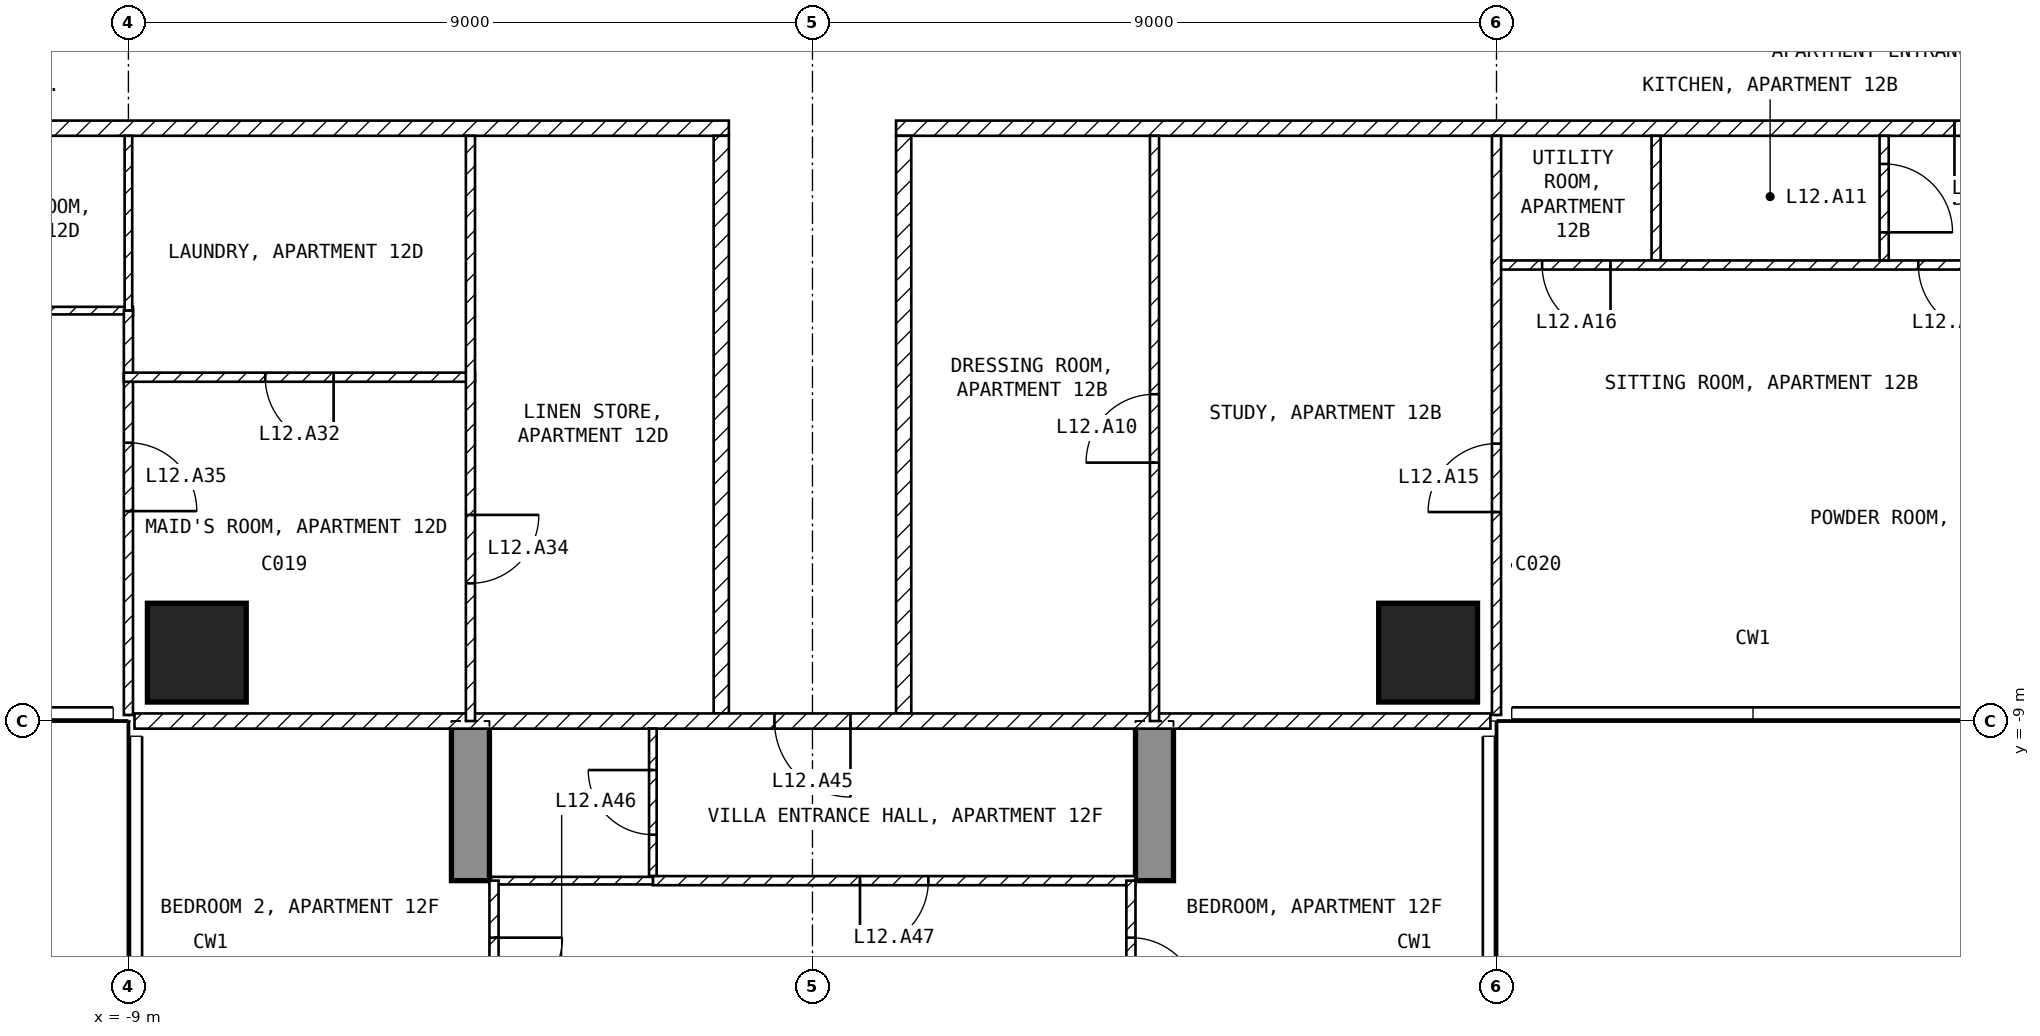
"""IFC4 building model, lengths in metres.
Left out: names, types, materials, properties, quantities, classifications, styles, units other than length and angle.
Written with IfcOpenShell. Run it as: python <this file> out.ifc"""

import sys

from ifc_helpers import new_model, si_unit, direction, frame, frame_2d, origin, origin_2d, place, context, subcontext, project, spatial, polyline, rectangle, outline, extrude, element, fill, save


model = new_model("IFC4")
c1 = context("Model", 3, precision=1e-05, world=origin(), true_north=direction((0.0, 1.0)))
c2 = subcontext(c1, "Body", "Model", "MODEL_VIEW")
j1 = project(units=[si_unit("LENGTHUNIT", "METRE"), si_unit("PLANEANGLEUNIT", "RADIAN")], contexts=[c1])
p1 = place(None, origin())
s1 = spatial("IfcSite", under=j1, at=p1, CompositionType="ELEMENT")
p2 = place(p1, origin())
s2 = spatial("IfcBuilding", under=s1, at=p2, CompositionType="ELEMENT")
p3 = place(p2, frame((0.0, 0.0, 61.0)))
s3 = spatial("IfcBuildingStorey", under=s2, at=p3, CompositionType="ELEMENT", Elevation=61.0)
for number, where, z_axis, x_axis in (
    (1, (-8.1, -8.1, -0.25), (0.0, 0.0, 1.0), (1.0, 0.0, 0.0)),
    (2, (8.1, -8.1, -0.25), (0.0, 0.0, 1.0), (1.0, 0.0, 0.0)),
):
    element("IfcColumn", number, at=place(p3, frame(where, z_axis=z_axis, x_axis=x_axis)), inside=s3, PredefinedType="COLUMN", context=c2, shape_type="SweptSolid", body=[
        extrude(rectangle(XDim=1.3, YDim=1.3, at=origin_2d()), origin(), (0.0, 0.0, 1.0), 3.5),
    ])
for number, where, z_axis, x_axis in (
    (3, (-4.75, -25.45, -0.25), (1.0, 0.0, 0.0), (0.0, 1.0, 0.0)),
    (4, (4.25, -25.45, -0.25), (1.0, 0.0, 0.0), (0.0, 1.0, 0.0)),
):
    element("IfcWall", number, at=place(p3, frame(where, z_axis=z_axis, x_axis=x_axis)), inside=s3, PredefinedType="SHEAR", context=c2, shape_type="SweptSolid", body=[
        extrude(outline(polyline([(0.0, 0.0), (4.15, 0.0), (4.15, 2.65), (6.55, 2.65), (6.55, 0.0), (11.95, 0.0), (11.95, 2.65), (14.35, 2.65), (14.35, 0.0), (16.45, 0.0), (16.45, 3.5), (0.0, 3.5), (0.0, 0.0)])), origin(), (0.0, 0.0, 1.0), 0.5),
    ])
p4 = place(p3, frame((21.6, -1.2, 0.0), z_axis=(0.0, 0.0, 1.0), x_axis=(-1.0, 0.0, 0.0)))
e5 = element("IfcWall", 5, at=p4, inside=s3, PredefinedType="PARTITIONING", context=c2, shape_type="SweptSolid", body=[
    extrude(rectangle(XDim=20.5, YDim=0.2, at=frame_2d((10.25, 0.0))), origin(), (0.0, 0.0, 1.0), 3.25),
])
p5 = place(p4, frame((5.575, 0.0, 0.0)))
e6 = element("IfcOpeningElement", 6, at=p5, cuts=e5, PredefinedType="OPENING", context=c2, shape_type="SweptSolid", body=[
    extrude(rectangle(XDim=1.0, YDim=2.1, at=frame_2d((0.5, 1.05))), frame((0.0, 0.11, 0.0), z_axis=(0.0, -1.0, 0.0), x_axis=(1.0, 0.0, 0.0)), (0.0, 0.0, 1.0), 0.22),
])
p6 = place(p3, frame((1.2, -1.3, 0.0), z_axis=(0.0, 0.0, 1.0), x_axis=(0.0, -1.0, 0.0)))
e7 = element("IfcWall", 7, at=p6, inside=s3, PredefinedType="PARTITIONING", context=c2, shape_type="SweptSolid", body=[
    extrude(rectangle(XDim=7.6, YDim=0.2, at=frame_2d((3.8, 0.0))), origin(), (0.0, 0.0, 1.0), 3.25),
])
p7 = place(p3, frame((-1.1, -1.2, 0.0), z_axis=(0.0, 0.0, 1.0), x_axis=(-1.0, 0.0, 0.0)))
e8 = element("IfcWall", 8, at=p7, inside=s3, PredefinedType="PARTITIONING", context=c2, shape_type="SweptSolid", body=[
    extrude(rectangle(XDim=20.5, YDim=0.2, at=frame_2d((10.25, 0.0))), origin(), (0.0, 0.0, 1.0), 3.25),
])
p8 = place(p7, frame((16.025, 0.0, 0.0)))
e9 = element("IfcOpeningElement", 9, at=p8, cuts=e8, PredefinedType="OPENING", context=c2, shape_type="SweptSolid", body=[
    extrude(rectangle(XDim=1.0, YDim=2.1, at=frame_2d((0.5, 1.05))), frame((0.0, 0.11, 0.0), z_axis=(0.0, -1.0, 0.0), x_axis=(1.0, 0.0, 0.0)), (0.0, 0.0, 1.0), 0.22),
])
p9 = place(p3, frame((-1.2, -8.9, 0.0), z_axis=(0.0, 0.0, 1.0), x_axis=(0.0, 1.0, 0.0)))
e10 = element("IfcWall", 10, at=p9, inside=s3, PredefinedType="PARTITIONING", context=c2, shape_type="SweptSolid", body=[
    extrude(rectangle(XDim=7.6, YDim=0.2, at=frame_2d((3.8, 0.0))), origin(), (0.0, 0.0, 1.0), 3.25),
])
p10 = place(p3, frame((8.92, -9.0, 0.0), z_axis=(0.0, 0.0, 1.0), x_axis=(-1.0, 0.0, 0.0)))
e11 = element("IfcWall", 11, at=p10, inside=s3, PredefinedType="PARTITIONING", context=c2, shape_type="SweptSolid", body=[
    extrude(rectangle(XDim=17.84, YDim=0.2, at=frame_2d((8.92, 0.0))), origin(), (0.0, 0.0, 1.0), 3.25),
])
p11 = place(p10, frame((8.42, 0.0, 0.0)))
e12 = element("IfcOpeningElement", 12, at=p11, cuts=e11, PredefinedType="OPENING", context=c2, shape_type="SweptSolid", body=[
    extrude(rectangle(XDim=1.0, YDim=2.1, at=frame_2d((0.5, 1.05))), frame((0.0, 0.11, 0.0), z_axis=(0.0, -1.0, 0.0), x_axis=(1.0, 0.0, 0.0)), (0.0, 0.0, 1.0), 0.22),
])
p12 = place(p3, frame((11.1, -1.3, 0.0), z_axis=(0.0, 0.0, 1.0), x_axis=(0.0, -1.0, 0.0)))
e13 = element("IfcWall", 13, at=p12, inside=s3, PredefinedType="PARTITIONING", context=c2, shape_type="SweptSolid", body=[
    extrude(rectangle(XDim=1.64, YDim=0.12, at=frame_2d((0.82, 0.0))), origin(), (0.0, 0.0, 1.0), 3.25),
])
p13 = place(p3, frame((15.9, -3.0, 0.0), z_axis=(0.0, 0.0, 1.0), x_axis=(-1.0, 0.0, 0.0)))
e14 = element("IfcWall", 14, at=p13, inside=s3, PredefinedType="PARTITIONING", context=c2, shape_type="SweptSolid", body=[
    extrude(rectangle(XDim=6.96, YDim=0.12, at=frame_2d((3.48, 0.0))), origin(), (0.0, 0.0, 1.0), 3.25),
])
p14 = place(p13, frame((0.45, 0.0, 0.0)))
e15 = element("IfcOpeningElement", 15, at=p14, cuts=e14, PredefinedType="OPENING", context=c2, shape_type="SweptSolid", body=[
    extrude(rectangle(XDim=0.9, YDim=2.1, at=frame_2d((0.45, 1.05))), frame((0.0, 0.07, 0.0), z_axis=(0.0, -1.0, 0.0), x_axis=(1.0, 0.0, 0.0)), (0.0, 0.0, 1.0), 0.14),
])
p15 = place(p13, frame((5.4, 0.0, 0.0)))
e16 = element("IfcOpeningElement", 16, at=p15, cuts=e14, PredefinedType="OPENING", context=c2, shape_type="SweptSolid", body=[
    extrude(rectangle(XDim=0.9, YDim=2.1, at=frame_2d((0.45, 1.05))), frame((0.0, 0.07, 0.0), z_axis=(0.0, -1.0, 0.0), x_axis=(1.0, 0.0, 0.0)), (0.0, 0.0, 1.0), 0.14),
])
p16 = place(p3, frame((9.0, -8.92, 0.0), z_axis=(0.0, 0.0, 1.0), x_axis=(0.0, 1.0, 0.0)))
e17 = element("IfcWall", 17, at=p16, inside=s3, PredefinedType="PARTITIONING", context=c2, shape_type="SweptSolid", body=[
    extrude(rectangle(XDim=7.62, YDim=0.12, at=frame_2d((3.81, 0.0))), origin(), (0.0, 0.0, 1.0), 3.25),
])
p17 = place(p16, frame((2.67, 0.0, 0.0)))
e18 = element("IfcOpeningElement", 18, at=p17, cuts=e17, PredefinedType="OPENING", context=c2, shape_type="SweptSolid", body=[
    extrude(rectangle(XDim=0.9, YDim=2.1, at=frame_2d((0.45, 1.05))), frame((0.0, 0.07, 0.0), z_axis=(0.0, -1.0, 0.0), x_axis=(1.0, 0.0, 0.0)), (0.0, 0.0, 1.0), 0.14),
])
p18 = place(p3, frame((14.1, -1.3, 0.0), z_axis=(0.0, 0.0, 1.0), x_axis=(0.0, -1.0, 0.0)))
e19 = element("IfcWall", 19, at=p18, inside=s3, PredefinedType="PARTITIONING", context=c2, shape_type="SweptSolid", body=[
    extrude(rectangle(XDim=1.64, YDim=0.12, at=frame_2d((0.82, 0.0))), origin(), (0.0, 0.0, 1.0), 3.25),
])
p19 = place(p18, frame((0.37, 0.0, 0.0)))
e20 = element("IfcOpeningElement", 20, at=p19, cuts=e19, PredefinedType="OPENING", context=c2, shape_type="SweptSolid", body=[
    extrude(rectangle(XDim=0.9, YDim=2.1, at=frame_2d((0.45, 1.05))), frame((0.0, 0.07, 0.0), z_axis=(0.0, -1.0, 0.0), x_axis=(1.0, 0.0, 0.0)), (0.0, 0.0, 1.0), 0.14),
])
p20 = place(p3, frame((4.5, -9.0, 0.0), z_axis=(0.0, 0.0, 1.0), x_axis=(0.0, 1.0, 0.0)))
e21 = element("IfcWall", 21, at=p20, inside=s3, PredefinedType="PARTITIONING", context=c2, shape_type="SweptSolid", body=[
    extrude(rectangle(XDim=7.7, YDim=0.12, at=frame_2d((3.85, 0.0))), origin(), (0.0, 0.0, 1.0), 3.25),
])
p21 = place(p20, frame((3.4, 0.0, 0.0)))
e22 = element("IfcOpeningElement", 22, at=p21, cuts=e21, PredefinedType="OPENING", context=c2, shape_type="SweptSolid", body=[
    extrude(rectangle(XDim=0.9, YDim=2.1, at=frame_2d((0.45, 1.05))), frame((0.0, 0.07, 0.0), z_axis=(0.0, -1.0, 0.0), x_axis=(1.0, 0.0, 0.0)), (0.0, 0.0, 1.0), 0.14),
])
p22 = place(p3, frame((-8.94, -3.6, 0.0), z_axis=(0.0, 0.0, 1.0), x_axis=(-1.0, 0.0, 0.0)))
e23 = element("IfcWall", 23, at=p22, inside=s3, PredefinedType="PARTITIONING", context=c2, shape_type="SweptSolid", body=[
    extrude(rectangle(XDim=3.36, YDim=0.1, at=frame_2d((1.68, 0.0))), origin(), (0.0, 0.0, 1.0), 3.25),
])
p23 = place(p22, frame((1.285, 0.0, 0.0)))
e24 = element("IfcOpeningElement", 24, at=p23, cuts=e23, PredefinedType="OPENING", context=c2, shape_type="SweptSolid", body=[
    extrude(rectangle(XDim=0.85, YDim=2.1, at=frame_2d((0.425, 1.05))), frame((0.0, 0.06, 0.0), z_axis=(0.0, -1.0, 0.0), x_axis=(1.0, 0.0, 0.0)), (0.0, 0.0, 1.0), 0.12),
])
p24 = place(p3, frame((-9.0, -1.3, 0.0), z_axis=(0.0, 0.0, 1.0), x_axis=(0.0, -1.0, 0.0)))
e25 = element("IfcWall", 25, at=p24, inside=s3, PredefinedType="PARTITIONING", context=c2, shape_type="SweptSolid", body=[
    extrude(rectangle(XDim=2.3, YDim=0.1, at=frame_2d((1.15, 0.0))), origin(), (0.0, 0.0, 1.0), 3.25),
])
p25 = place(p3, frame((-9.0, -3.6, 0.0), z_axis=(0.0, 0.0, 1.0), x_axis=(0.0, -1.0, 0.0)))
e26 = element("IfcWall", 26, at=p25, inside=s3, PredefinedType="PARTITIONING", context=c2, shape_type="SweptSolid", body=[
    extrude(rectangle(XDim=5.32, YDim=0.12, at=frame_2d((2.66, 0.0))), origin(), (0.0, 0.0, 1.0), 3.25),
])
p26 = place(p25, frame((1.738, 0.0, 0.0)))
e27 = element("IfcOpeningElement", 27, at=p26, cuts=e26, PredefinedType="OPENING", context=c2, shape_type="SweptSolid", body=[
    extrude(rectangle(XDim=0.9, YDim=2.1, at=frame_2d((0.45, 1.05))), frame((0.0, 0.07, 0.0), z_axis=(0.0, -1.0, 0.0), x_axis=(1.0, 0.0, 0.0)), (0.0, 0.0, 1.0), 0.14),
])
p27 = place(p3, frame((-4.44, -4.476, 0.0), z_axis=(0.0, 0.0, 1.0), x_axis=(-1.0, 0.0, 0.0)))
e28 = element("IfcWall", 28, at=p27, inside=s3, PredefinedType="PARTITIONING", context=c2, shape_type="SweptSolid", body=[
    extrude(rectangle(XDim=4.62, YDim=0.12, at=frame_2d((2.31, 0.0))), origin(), (0.0, 0.0, 1.0), 3.25),
])
p28 = place(p27, frame((1.86, 0.0, 0.0)))
e29 = element("IfcOpeningElement", 29, at=p28, cuts=e28, PredefinedType="OPENING", context=c2, shape_type="SweptSolid", body=[
    extrude(rectangle(XDim=0.9, YDim=2.1, at=frame_2d((0.45, 1.05))), frame((0.0, 0.07, 0.0), z_axis=(0.0, -1.0, 0.0), x_axis=(1.0, 0.0, 0.0)), (0.0, 0.0, 1.0), 0.14),
])
p29 = place(p3, frame((-4.5, -1.3, 0.0), z_axis=(0.0, 0.0, 1.0), x_axis=(0.0, -1.0, 0.0)))
e30 = element("IfcWall", 30, at=p29, inside=s3, PredefinedType="PARTITIONING", context=c2, shape_type="SweptSolid", body=[
    extrude(rectangle(XDim=7.7, YDim=0.12, at=frame_2d((3.85, 0.0))), origin(), (0.0, 0.0, 1.0), 3.25),
])
p30 = place(p29, frame((4.988, 0.0, 0.0)))
e31 = element("IfcOpeningElement", 31, at=p30, cuts=e30, PredefinedType="OPENING", context=c2, shape_type="SweptSolid", body=[
    extrude(rectangle(XDim=0.9, YDim=2.1, at=frame_2d((0.45, 1.05))), frame((0.0, 0.07, 0.0), z_axis=(0.0, -1.0, 0.0), x_axis=(1.0, 0.0, 0.0)), (0.0, 0.0, 1.0), 0.14),
])
p31 = place(p3, frame((-2.1, -11.04, 0.0), z_axis=(0.0, 0.0, 1.0), x_axis=(0.0, 1.0, 0.0)))
e32 = element("IfcWall", 32, at=p31, inside=s3, PredefinedType="PARTITIONING", context=c2, shape_type="SweptSolid", body=[
    extrude(rectangle(XDim=1.94, YDim=0.1, at=frame_2d((0.97, 0.0))), origin(), (0.0, 0.0, 1.0), 3.25),
])
p32 = place(p31, frame((0.545, 0.0, 0.0)))
e33 = element("IfcOpeningElement", 33, at=p32, cuts=e32, PredefinedType="OPENING", context=c2, shape_type="SweptSolid", body=[
    extrude(rectangle(XDim=0.85, YDim=2.1, at=frame_2d((0.425, 1.05))), frame((0.0, 0.06, 0.0), z_axis=(0.0, -1.0, 0.0), x_axis=(1.0, 0.0, 0.0)), (0.0, 0.0, 1.0), 0.12),
])
p33 = place(p3, frame((4.25, -11.1, 0.0), z_axis=(0.0, 0.0, 1.0), x_axis=(-1.0, 0.0, 0.0)))
e34 = element("IfcWall", 34, at=p33, inside=s3, PredefinedType="PARTITIONING", context=c2, shape_type="SweptSolid", body=[
    extrude(rectangle(XDim=6.35, YDim=0.12, at=frame_2d((3.175, 0.0))), origin(), (0.0, 0.0, 1.0), 3.25),
])
p34 = place(p33, frame((2.725, 0.0, 0.0)))
e35 = element("IfcOpeningElement", 35, at=p34, cuts=e34, PredefinedType="OPENING", context=c2, shape_type="SweptSolid", body=[
    extrude(rectangle(XDim=0.9, YDim=2.1, at=frame_2d((0.45, 1.05))), frame((0.0, 0.07, 0.0), z_axis=(0.0, -1.0, 0.0), x_axis=(1.0, 0.0, 0.0)), (0.0, 0.0, 1.0), 0.14),
])
p35 = place(p3, frame((-2.1, -11.1, 0.0), z_axis=(0.0, 0.0, 1.0), x_axis=(-1.0, 0.0, 0.0)))
e36 = element("IfcWall", 36, at=p35, inside=s3, PredefinedType="PARTITIONING", context=c2, shape_type="SweptSolid", body=[
    extrude(rectangle(XDim=2.15, YDim=0.1, at=frame_2d((1.075, 0.0))), origin(), (0.0, 0.0, 1.0), 3.25),
])
p36 = place(p3, frame((4.19, -11.1, 0.0), z_axis=(0.0, 0.0, 1.0), x_axis=(0.0, -1.0, 0.0)))
e37 = element("IfcWall", 37, at=p36, inside=s3, PredefinedType="PARTITIONING", context=c2, shape_type="SweptSolid", body=[
    extrude(rectangle(XDim=2.4, YDim=0.12, at=frame_2d((1.2, 0.0))), origin(), (0.0, 0.0, 1.0), 2.4),
])
p37 = place(p36, frame((0.75, 0.0, 0.0)))
e38 = element("IfcOpeningElement", 38, at=p37, cuts=e37, PredefinedType="OPENING", context=c2, shape_type="SweptSolid", body=[
    extrude(rectangle(XDim=0.9, YDim=2.1, at=frame_2d((0.45, 1.05))), frame((0.0, 0.07, 0.0), z_axis=(0.0, -1.0, 0.0), x_axis=(1.0, 0.0, 0.0)), (0.0, 0.0, 1.0), 0.14),
])
p38 = place(p3, frame((-4.19, -11.1, 0.0), z_axis=(0.0, 0.0, 1.0), x_axis=(0.0, -1.0, 0.0)))
e39 = element("IfcWall", 39, at=p38, inside=s3, PredefinedType="PARTITIONING", context=c2, shape_type="SweptSolid", body=[
    extrude(rectangle(XDim=2.4, YDim=0.12, at=frame_2d((1.2, 0.0))), origin(), (0.0, 0.0, 1.0), 2.4),
])
p39 = place(p38, frame((0.75, 0.0, 0.0)))
e40 = element("IfcOpeningElement", 40, at=p39, cuts=e39, PredefinedType="OPENING", context=c2, shape_type="SweptSolid", body=[
    extrude(rectangle(XDim=0.9, YDim=2.1, at=frame_2d((0.45, 1.05))), frame((0.0, 0.07, 0.0), z_axis=(0.0, -1.0, 0.0), x_axis=(1.0, 0.0, 0.0)), (0.0, 0.0, 1.0), 0.14),
])
p40 = place(p21, origin())
e41 = element("IfcDoor", 41, at=p40, inside=s3, OperationType="SINGLE_SWING_LEFT", PredefinedType="DOOR", context=c2, shape_type="SweptSolid", body=[
    extrude(rectangle(XDim=0.9, YDim=2.1, at=frame_2d((0.45, 1.05))), frame((0.0, 0.025, 0.0), z_axis=(0.0, -1.0, 0.0), x_axis=(1.0, 0.0, 0.0)), (0.0, 0.0, 1.0), 0.05),
])
fill(e22, e41)
p41 = place(p19, origin())
e42 = element("IfcDoor", 42, at=p41, inside=s3, OperationType="SINGLE_SWING_RIGHT", PredefinedType="DOOR", context=c2, shape_type="SweptSolid", body=[
    extrude(rectangle(XDim=0.9, YDim=2.1, at=frame_2d((0.45, 1.05))), frame((0.0, 0.025, 0.0), z_axis=(0.0, -1.0, 0.0), x_axis=(1.0, 0.0, 0.0)), (0.0, 0.0, 1.0), 0.05),
])
fill(e20, e42)
p42 = place(p14, origin())
e43 = element("IfcDoor", 43, at=p42, inside=s3, OperationType="SINGLE_SWING_LEFT", PredefinedType="DOOR", context=c2, shape_type="SweptSolid", body=[
    extrude(rectangle(XDim=0.9, YDim=2.1, at=frame_2d((0.45, 1.05))), frame((0.0, 0.025, 0.0), z_axis=(0.0, -1.0, 0.0), x_axis=(1.0, 0.0, 0.0)), (0.0, 0.0, 1.0), 0.05),
])
fill(e15, e43)
p43 = place(p17, origin())
e44 = element("IfcDoor", 44, at=p43, inside=s3, OperationType="SINGLE_SWING_LEFT", PredefinedType="DOOR", context=c2, shape_type="SweptSolid", body=[
    extrude(rectangle(XDim=0.9, YDim=2.1, at=frame_2d((0.45, 1.05))), frame((0.0, 0.025, 0.0), z_axis=(0.0, -1.0, 0.0), x_axis=(1.0, 0.0, 0.0)), (0.0, 0.0, 1.0), 0.05),
])
fill(e18, e44)
p44 = place(p15, origin())
e45 = element("IfcDoor", 45, at=p44, inside=s3, OperationType="SINGLE_SWING_LEFT", PredefinedType="DOOR", context=c2, shape_type="SweptSolid", body=[
    extrude(rectangle(XDim=0.9, YDim=2.1, at=frame_2d((0.45, 1.05))), frame((0.0, 0.025, 0.0), z_axis=(0.0, -1.0, 0.0), x_axis=(1.0, 0.0, 0.0)), (0.0, 0.0, 1.0), 0.05),
])
fill(e16, e45)
p45 = place(p28, origin())
e46 = element("IfcDoor", 46, at=p45, inside=s3, OperationType="SINGLE_SWING_LEFT", PredefinedType="DOOR", context=c2, shape_type="SweptSolid", body=[
    extrude(rectangle(XDim=0.9, YDim=2.1, at=frame_2d((0.45, 1.05))), frame((0.0, 0.025, 0.0), z_axis=(0.0, -1.0, 0.0), x_axis=(1.0, 0.0, 0.0)), (0.0, 0.0, 1.0), 0.05),
])
fill(e29, e46)
p46 = place(p30, origin())
e47 = element("IfcDoor", 47, at=p46, inside=s3, OperationType="SINGLE_SWING_LEFT", PredefinedType="DOOR", context=c2, shape_type="SweptSolid", body=[
    extrude(rectangle(XDim=0.9, YDim=2.1, at=frame_2d((0.45, 1.05))), frame((0.0, 0.025, 0.0), z_axis=(0.0, -1.0, 0.0), x_axis=(1.0, 0.0, 0.0)), (0.0, 0.0, 1.0), 0.05),
])
fill(e31, e47)
p47 = place(p26, origin())
e48 = element("IfcDoor", 48, at=p47, inside=s3, OperationType="SINGLE_SWING_RIGHT", PredefinedType="DOOR", context=c2, shape_type="SweptSolid", body=[
    extrude(rectangle(XDim=0.9, YDim=2.1, at=frame_2d((0.45, 1.05))), frame((0.0, 0.025, 0.0), z_axis=(0.0, -1.0, 0.0), x_axis=(1.0, 0.0, 0.0)), (0.0, 0.0, 1.0), 0.05),
])
fill(e27, e48)
p48 = place(p11, origin())
e49 = element("IfcDoor", 49, at=p48, inside=s3, OperationType="SINGLE_SWING_LEFT", PredefinedType="DOOR", context=c2, shape_type="SweptSolid", body=[
    extrude(rectangle(XDim=1.0, YDim=2.1, at=frame_2d((0.5, 1.05))), frame((0.0, 0.025, 0.0), z_axis=(0.0, -1.0, 0.0), x_axis=(1.0, 0.0, 0.0)), (0.0, 0.0, 1.0), 0.05),
])
fill(e12, e49)
p49 = place(p32, origin())
e50 = element("IfcDoor", 50, at=p49, inside=s3, OperationType="SINGLE_SWING_RIGHT", PredefinedType="DOOR", context=c2, shape_type="SweptSolid", body=[
    extrude(rectangle(XDim=0.85, YDim=2.1, at=frame_2d((0.425, 1.05))), frame((0.0, 0.025, 0.0), z_axis=(0.0, -1.0, 0.0), x_axis=(1.0, 0.0, 0.0)), (0.0, 0.0, 1.0), 0.05),
])
fill(e33, e50)
p50 = place(p34, origin())
e51 = element("IfcDoor", 51, at=p50, inside=s3, OperationType="SINGLE_SWING_RIGHT", PredefinedType="DOOR", context=c2, shape_type="SweptSolid", body=[
    extrude(rectangle(XDim=0.9, YDim=2.1, at=frame_2d((0.45, 1.05))), frame((0.0, 0.025, 0.0), z_axis=(0.0, -1.0, 0.0), x_axis=(1.0, 0.0, 0.0)), (0.0, 0.0, 1.0), 0.05),
])
fill(e35, e51)
p51 = place(p5, origin())
e52 = element("IfcDoor", 52, at=p51, inside=s3, OperationType="SINGLE_SWING_RIGHT", PredefinedType="DOOR", context=c2, shape_type="SweptSolid", body=[
    extrude(rectangle(XDim=1.0, YDim=2.1, at=frame_2d((0.5, 1.05))), frame((0.0, 0.025, 0.0), z_axis=(0.0, -1.0, 0.0), x_axis=(1.0, 0.0, 0.0)), (0.0, 0.0, 1.0), 0.05),
])
fill(e6, e52)
p52 = place(p37, origin())
e53 = element("IfcDoor", 53, at=p52, inside=s3, OperationType="SINGLE_SWING_RIGHT", PredefinedType="DOOR", context=c2, shape_type="SweptSolid", body=[
    extrude(rectangle(XDim=0.9, YDim=2.1, at=frame_2d((0.45, 1.05))), frame((0.0, 0.025, 0.0), z_axis=(0.0, -1.0, 0.0), x_axis=(1.0, 0.0, 0.0)), (0.0, 0.0, 1.0), 0.05),
])
fill(e38, e53)
p53 = place(p39, origin())
e54 = element("IfcDoor", 54, at=p53, inside=s3, OperationType="SINGLE_SWING_LEFT", PredefinedType="DOOR", context=c2, shape_type="SweptSolid", body=[
    extrude(rectangle(XDim=0.9, YDim=2.1, at=frame_2d((0.45, 1.05))), frame((0.0, 0.025, 0.0), z_axis=(0.0, -1.0, 0.0), x_axis=(1.0, 0.0, 0.0)), (0.0, 0.0, 1.0), 0.05),
])
fill(e40, e54)
save(model, sys.argv[1])
